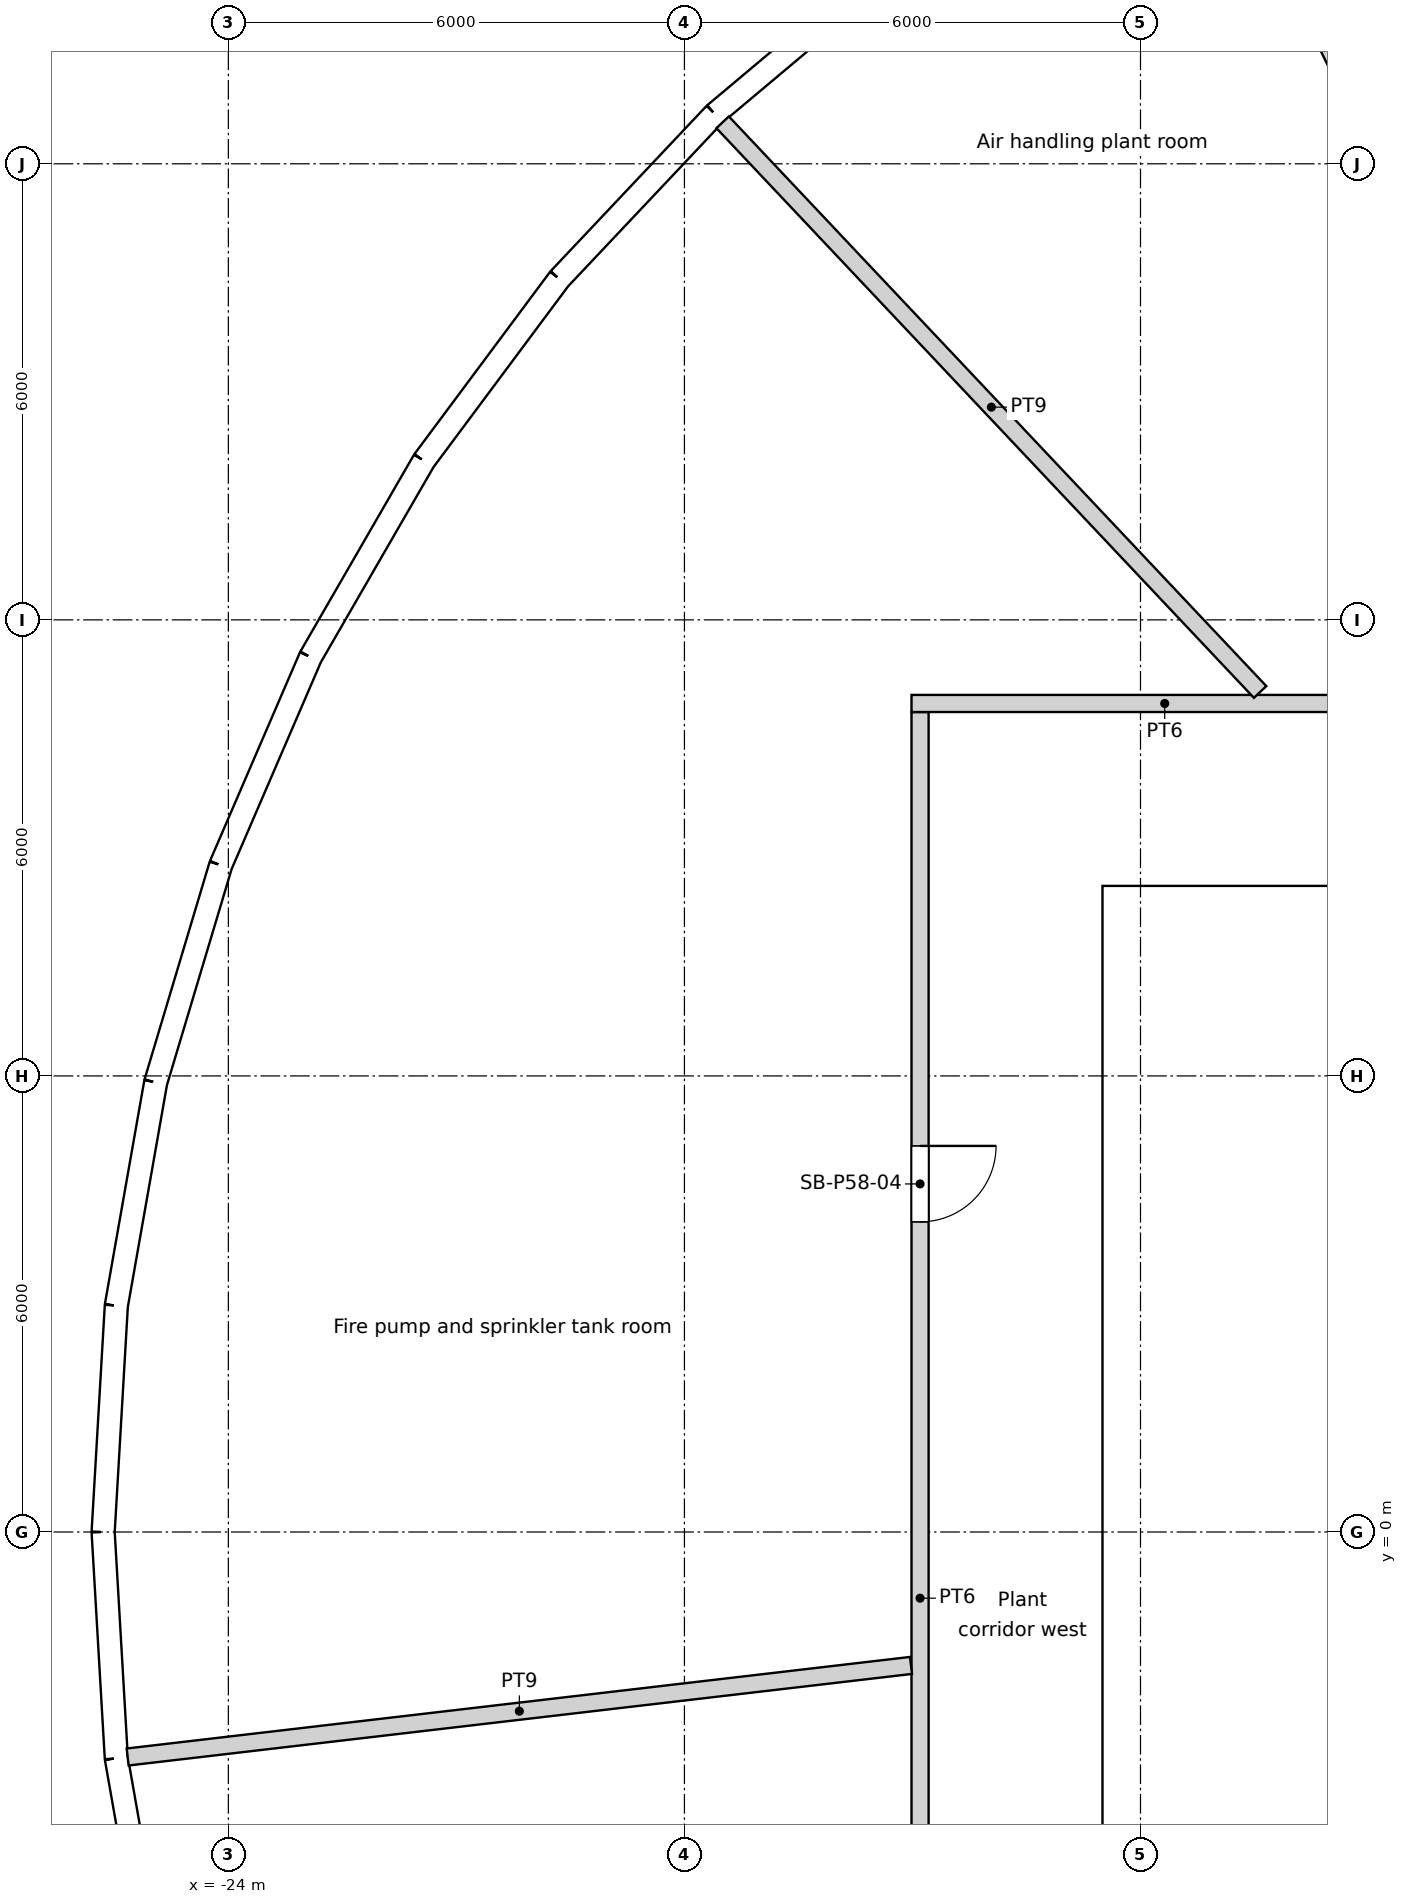
"""IFC4 building model, lengths in metres.
Left out: names, types, materials, properties, quantities, classifications, styles, units other than length and angle.
Written with IfcOpenShell. Run it as: python <this file> out.ifc"""

import sys

from ifc_helpers import new_model, si_unit, direction, frame, frame_2d, origin, origin_2d, place, context, subcontext, project, spatial, rectangle, circle, extrude, element, fill, save


model = new_model("IFC4")
c1 = context("Model", 3, precision=1e-05, world=origin(), true_north=direction((0.0, 1.0)))
c2 = subcontext(c1, "Body", "Model", "MODEL_VIEW")
j1 = project(units=[si_unit("LENGTHUNIT", "METRE"), si_unit("PLANEANGLEUNIT", "RADIAN")], contexts=[c1])
p1 = place(None, origin())
s1 = spatial("IfcSite", under=j1, at=p1, CompositionType="ELEMENT")
p2 = place(p1, origin())
s2 = spatial("IfcBuilding", under=s1, at=p2, CompositionType="ELEMENT")
p3 = place(p2, frame((0.0, 0.0, 225.0)))
s3 = spatial("IfcBuildingStorey", under=s2, at=p3, CompositionType="ELEMENT", Elevation=225.0)
for number, where, z_axis, x_axis in (
    (1, (-16.846, 17.855, 0.0), (0.0, 0.0, 1.0), (1.0, 0.0, 0.0)),
    (2, (-20.509, 13.489, 0.0), (0.0, 0.0, 1.0), (1.0, 0.0, 0.0)),
    (3, (-23.067, 8.396, 0.0), (0.0, 0.0, 1.0), (1.0, 0.0, 0.0)),
    (4, (-24.382, 2.85, 0.0), (0.0, 0.0, 1.0), (1.0, 0.0, 0.0)),
    (5, (-24.382, -2.85, 0.0), (0.0, 0.0, 1.0), (1.0, 0.0, 0.0)),
):
    element("IfcColumn", number, at=place(p3, frame(where, z_axis=z_axis, x_axis=x_axis)), inside=s3, PredefinedType="COLUMN", context=c2, shape_type="SweptSolid", body=[
        extrude(circle(Radius=0.6, at=origin_2d()), origin(), (0.0, 0.0, 1.0), 6.0),
    ])
for number, where, z_axis, x_axis in (
    (6, (-9.411, 16.301, 0.0), (0.0, 0.0, 1.0), (1.0, 0.0, 0.0)),
    (7, (-13.798, 12.802, 0.0), (0.0, 0.0, 1.0), (1.0, 0.0, 0.0)),
    (8, (-16.958, 8.167, 0.0), (0.0, 0.0, 1.0), (1.0, 0.0, 0.0)),
    (9, (-18.612, 2.805, 0.0), (0.0, 0.0, 1.0), (1.0, 0.0, 0.0)),
    (10, (-18.612, -2.805, 0.0), (0.0, 0.0, 1.0), (1.0, 0.0, 0.0)),
):
    element("IfcColumn", number, at=place(p3, frame(where, z_axis=z_axis, x_axis=x_axis)), inside=s3, PredefinedType="COLUMN", context=c2, shape_type="SweptSolid", body=[
        extrude(circle(Radius=0.65, at=origin_2d()), origin(), (0.0, 0.0, 1.0), 6.0),
    ])
p4 = place(p3, frame((-15.316, 20.573, 0.0), z_axis=(0.0, 0.0, 1.0), x_axis=(-0.766015999952, -0.64282150541, 0.0)))
e11 = element("IfcWall", 11, at=p4, inside=s3, PredefinedType="SOLIDWALL", context=c2, shape_type="SweptSolid", body=[
    extrude(rectangle(XDim=2.982, YDim=0.3, at=frame_2d((1.491, 0.0))), origin(), (0.0, 0.0, 1.0), 5.65),
])
p5 = place(p4, frame((1.491, 0.0, 1.825)))
e12 = element("IfcOpeningElement", 12, at=p5, cuts=e11, PredefinedType="OPENING", context=c2, shape_type="SweptSolid", body=[
    extrude(circle(Radius=1.2, at=origin_2d()), frame((0.0, 0.16, 0.0), z_axis=(0.0, -1.0, 0.0), x_axis=(1.0, 0.0, 0.0)), (0.0, 0.0, 1.0), 0.32),
])
p6 = place(p3, frame((-17.6, 18.655, 0.0), z_axis=(0.0, 0.0, 1.0), x_axis=(-0.686219609698, -0.72739442345, 0.0)))
e13 = element("IfcWall", 13, at=p6, inside=s3, PredefinedType="SOLIDWALL", context=c2, shape_type="SweptSolid", body=[
    extrude(rectangle(XDim=2.982, YDim=0.3, at=frame_2d((1.491, 0.0))), origin(), (0.0, 0.0, 1.0), 5.65),
])
p7 = place(p6, frame((1.491, 0.0, 1.825)))
e14 = element("IfcOpeningElement", 14, at=p7, cuts=e13, PredefinedType="OPENING", context=c2, shape_type="SweptSolid", body=[
    extrude(circle(Radius=1.2, at=origin_2d()), frame((0.0, 0.16, 0.0), z_axis=(0.0, -1.0, 0.0), x_axis=(1.0, 0.0, 0.0)), (0.0, 0.0, 1.0), 0.32),
])
p8 = place(p3, frame((-19.647, 16.486, 0.0), z_axis=(0.0, 0.0, 1.0), x_axis=(-0.597206768034, -0.802087324557, 0.0)))
e15 = element("IfcWall", 15, at=p8, inside=s3, PredefinedType="SOLIDWALL", context=c2, shape_type="SweptSolid", body=[
    extrude(rectangle(XDim=2.983, YDim=0.3, at=frame_2d((1.491, 0.0))), origin(), (0.0, 0.0, 1.0), 5.65),
])
p9 = place(p8, frame((1.491, 0.0, 1.825)))
e16 = element("IfcOpeningElement", 16, at=p9, cuts=e15, PredefinedType="OPENING", context=c2, shape_type="SweptSolid", body=[
    extrude(circle(Radius=1.2, at=origin_2d()), frame((0.0, 0.16, 0.0), z_axis=(0.0, -1.0, 0.0), x_axis=(1.0, 0.0, 0.0)), (0.0, 0.0, 1.0), 0.32),
])
p10 = place(p3, frame((-21.428, 14.094, 0.0), z_axis=(0.0, 0.0, 1.0), x_axis=(-0.499977539641, -0.866038370891, 0.0)))
e17 = element("IfcWall", 17, at=p10, inside=s3, PredefinedType="SOLIDWALL", context=c2, shape_type="SweptSolid", body=[
    extrude(rectangle(XDim=2.983, YDim=0.3, at=frame_2d((1.491, 0.0))), origin(), (0.0, 0.0, 1.0), 5.65),
])
p11 = place(p10, frame((1.491, 0.0, 1.825)))
e18 = element("IfcOpeningElement", 18, at=p11, cuts=e17, PredefinedType="OPENING", context=c2, shape_type="SweptSolid", body=[
    extrude(circle(Radius=1.2, at=origin_2d()), frame((0.0, 0.16, 0.0), z_axis=(0.0, -1.0, 0.0), x_axis=(1.0, 0.0, 0.0)), (0.0, 0.0, 1.0), 0.32),
])
p12 = place(p3, frame((-22.919, 11.51, 0.0), z_axis=(0.0, 0.0, 1.0), x_axis=(-0.396111410027, -0.918202456349, 0.0)))
e19 = element("IfcWall", 19, at=p12, inside=s3, PredefinedType="SOLIDWALL", context=c2, shape_type="SweptSolid", body=[
    extrude(rectangle(XDim=2.982, YDim=0.3, at=frame_2d((1.491, 0.0))), origin(), (0.0, 0.0, 1.0), 5.65),
])
p13 = place(p12, frame((1.491, 0.0, 1.825)))
e20 = element("IfcOpeningElement", 20, at=p13, cuts=e19, PredefinedType="OPENING", context=c2, shape_type="SweptSolid", body=[
    extrude(circle(Radius=1.2, at=origin_2d()), frame((0.0, 0.16, 0.0), z_axis=(0.0, -1.0, 0.0), x_axis=(1.0, 0.0, 0.0)), (0.0, 0.0, 1.0), 0.32),
])
p14 = place(p3, frame((-24.101, 8.772, 0.0), z_axis=(0.0, 0.0, 1.0), x_axis=(-0.286754535355, -0.958004089998, 0.0)))
e21 = element("IfcWall", 21, at=p14, inside=s3, PredefinedType="SOLIDWALL", context=c2, shape_type="SweptSolid", body=[
    extrude(rectangle(XDim=2.982, YDim=0.3, at=frame_2d((1.491, 0.0))), origin(), (0.0, 0.0, 1.0), 5.65),
])
p15 = place(p14, frame((1.491, 0.0, 1.825)))
e22 = element("IfcOpeningElement", 22, at=p15, cuts=e21, PredefinedType="OPENING", context=c2, shape_type="SweptSolid", body=[
    extrude(circle(Radius=1.2, at=origin_2d()), frame((0.0, 0.16, 0.0), z_axis=(0.0, -1.0, 0.0), x_axis=(1.0, 0.0, 0.0)), (0.0, 0.0, 1.0), 0.32),
])
p16 = place(p3, frame((-24.956, 5.915, 0.0), z_axis=(0.0, 0.0, 1.0), x_axis=(-0.17369661102, -0.984799211677, 0.0)))
e23 = element("IfcWall", 23, at=p16, inside=s3, PredefinedType="SOLIDWALL", context=c2, shape_type="SweptSolid", body=[
    extrude(rectangle(XDim=2.983, YDim=0.3, at=frame_2d((1.491, 0.0))), origin(), (0.0, 0.0, 1.0), 5.65),
])
p17 = place(p16, frame((1.491, 0.0, 1.825)))
e24 = element("IfcOpeningElement", 24, at=p17, cuts=e23, PredefinedType="OPENING", context=c2, shape_type="SweptSolid", body=[
    extrude(circle(Radius=1.2, at=origin_2d()), frame((0.0, 0.16, 0.0), z_axis=(0.0, -1.0, 0.0), x_axis=(1.0, 0.0, 0.0)), (0.0, 0.0, 1.0), 0.32),
])
p18 = place(p3, frame((-25.474, 2.978, 0.0), z_axis=(0.0, 0.0, 1.0), x_axis=(-0.058117409476, -0.998309754894, 0.0)))
e25 = element("IfcWall", 25, at=p18, inside=s3, PredefinedType="SOLIDWALL", context=c2, shape_type="SweptSolid", body=[
    extrude(rectangle(XDim=2.983, YDim=0.3, at=frame_2d((1.491, 0.0))), origin(), (0.0, 0.0, 1.0), 5.65),
])
p19 = place(p18, frame((1.491, 0.0, 1.825)))
e26 = element("IfcOpeningElement", 26, at=p19, cuts=e25, PredefinedType="OPENING", context=c2, shape_type="SweptSolid", body=[
    extrude(circle(Radius=1.2, at=origin_2d()), frame((0.0, 0.16, 0.0), z_axis=(0.0, -1.0, 0.0), x_axis=(1.0, 0.0, 0.0)), (0.0, 0.0, 1.0), 0.32),
])
p20 = place(p3, frame((-25.647, 0.0, 0.0), z_axis=(0.0, 0.0, 1.0), x_axis=(0.058117409476, -0.998309754894, 0.0)))
e27 = element("IfcWall", 27, at=p20, inside=s3, PredefinedType="SOLIDWALL", context=c2, shape_type="SweptSolid", body=[
    extrude(rectangle(XDim=2.983, YDim=0.3, at=frame_2d((1.491, 0.0))), origin(), (0.0, 0.0, 1.0), 5.65),
])
p21 = place(p20, frame((1.491, 0.0, 1.825)))
e28 = element("IfcOpeningElement", 28, at=p21, cuts=e27, PredefinedType="OPENING", context=c2, shape_type="SweptSolid", body=[
    extrude(circle(Radius=1.2, at=origin_2d()), frame((0.0, 0.16, 0.0), z_axis=(0.0, -1.0, 0.0), x_axis=(1.0, 0.0, 0.0)), (0.0, 0.0, 1.0), 0.32),
])
p22 = place(p3, frame((-25.474, -2.978, 0.0), z_axis=(0.0, 0.0, 1.0), x_axis=(0.17369661102, -0.984799211677, 0.0)))
e29 = element("IfcWall", 29, at=p22, inside=s3, PredefinedType="SOLIDWALL", context=c2, shape_type="SweptSolid", body=[
    extrude(rectangle(XDim=2.983, YDim=0.3, at=frame_2d((1.491, 0.0))), origin(), (0.0, 0.0, 1.0), 5.65),
])
p23 = place(p22, frame((1.491, 0.0, 1.825)))
e30 = element("IfcOpeningElement", 30, at=p23, cuts=e29, PredefinedType="OPENING", context=c2, shape_type="SweptSolid", body=[
    extrude(circle(Radius=1.2, at=origin_2d()), frame((0.0, 0.16, 0.0), z_axis=(0.0, -1.0, 0.0), x_axis=(1.0, 0.0, 0.0)), (0.0, 0.0, 1.0), 0.32),
])
p24 = place(p3, frame((-12.5, 8.05, 0.0), z_axis=(0.0, 0.0, 1.0), x_axis=(1.0, 0.0, 0.0)))
e31 = element("IfcWall", 31, at=p24, inside=s3, PredefinedType="SOLIDWALL", context=c2, shape_type="SweptSolid", body=[
    extrude(rectangle(XDim=25.0, YDim=0.9, at=frame_2d((12.5, 0.0))), origin(), (0.0, 0.0, 1.0), 5.65),
])
p25 = place(p24, frame((8.3, 0.0, 0.0)))
e32 = element("IfcOpeningElement", 32, at=p25, cuts=e31, PredefinedType="OPENING", context=c2, shape_type="SweptSolid", body=[
    extrude(rectangle(XDim=1.8, YDim=2.1, at=frame_2d((0.9, 1.05))), frame((0.0, 0.45, 0.0), z_axis=(0.0, -1.0, 0.0), x_axis=(1.0, 0.0, 0.0)), (0.0, 0.0, 1.0), 0.9),
])
p26 = place(p3, frame((-12.05, -7.6, 0.0), z_axis=(0.0, 0.0, 1.0), x_axis=(0.0, 1.0, 0.0)))
e33 = element("IfcWall", 33, at=p26, inside=s3, PredefinedType="SOLIDWALL", context=c2, shape_type="SweptSolid", body=[
    extrude(rectangle(XDim=15.2, YDim=0.9, at=frame_2d((7.6, 0.0))), origin(), (0.0, 0.0, 1.0), 5.65),
])
p27 = place(p26, frame((7.1, 0.0, 0.0)))
e34 = element("IfcOpeningElement", 34, at=p27, cuts=e33, PredefinedType="OPENING", context=c2, shape_type="SweptSolid", body=[
    extrude(rectangle(XDim=1.0, YDim=2.1, at=frame_2d((0.5, 1.05))), frame((0.0, 0.45, 0.0), z_axis=(0.0, -1.0, 0.0), x_axis=(1.0, 0.0, 0.0)), (0.0, 0.0, 1.0), 0.9),
])
p28 = place(p3, frame((-11.6, 4.55, 0.0), z_axis=(0.0, 0.0, 1.0), x_axis=(1.0, 0.0, 0.0)))
e35 = element("IfcWall", 35, at=p28, inside=s3, PredefinedType="SOLIDWALL", context=c2, shape_type="SweptSolid", body=[
    extrude(rectangle(XDim=2.4, YDim=0.3, at=frame_2d((1.2, 0.0))), origin(), (0.0, 0.0, 1.0), 5.65),
])
p29 = place(p28, frame((0.6, 0.0, 0.0)))
e36 = element("IfcOpeningElement", 36, at=p29, cuts=e35, PredefinedType="OPENING", context=c2, shape_type="SweptSolid", body=[
    extrude(rectangle(XDim=1.2, YDim=2.1, at=frame_2d((0.6, 1.05))), frame((0.0, 0.15, 0.0), z_axis=(0.0, -1.0, 0.0), x_axis=(1.0, 0.0, 0.0)), (0.0, 0.0, 1.0), 0.3),
])
p30 = place(p3, frame((-25.325, -2.96, 0.0), z_axis=(0.0, 0.0, 1.0), x_axis=(0.993240732078, 0.116072598582, 0.0)))
e37 = element("IfcWall", 37, at=p30, inside=s3, PredefinedType="PARTITIONING", context=c2, shape_type="SweptSolid", body=[
    extrude(rectangle(XDim=10.376, YDim=0.225, at=frame_2d((5.188, 0.0))), origin(), (0.0, 0.0, 1.0), 2.7),
])
p31 = place(p3, frame((-17.497, 18.546, 0.0), z_axis=(0.0, 0.0, 1.0), x_axis=(0.686241478279, -0.727373792138, 0.0)))
e38 = element("IfcWall", 38, at=p31, inside=s3, PredefinedType="PARTITIONING", context=c2, shape_type="SweptSolid", body=[
    extrude(rectangle(XDim=10.304, YDim=0.225, at=frame_2d((5.152, 0.0))), origin(), (0.0, 0.0, 1.0), 2.7),
])
p32 = place(p3, frame((-14.9, 10.788, 0.0), z_axis=(0.0, 0.0, 1.0), x_axis=(0.0, -1.0, 0.0)))
e39 = element("IfcWall", 39, at=p32, inside=s3, PredefinedType="PARTITIONING", context=c2, shape_type="SweptSolid", body=[
    extrude(rectangle(XDim=21.8, YDim=0.225, at=frame_2d((10.9, 0.0))), origin(), (0.0, 0.0, 1.0), 5.2),
])
p33 = place(p32, frame((5.708, 0.0, 0.0)))
e40 = element("IfcOpeningElement", 40, at=p33, cuts=e39, PredefinedType="OPENING", context=c2, shape_type="SweptSolid", body=[
    extrude(rectangle(XDim=1.0, YDim=2.1, at=frame_2d((0.5, 1.05))), frame((0.0, 0.113, 0.0), z_axis=(0.0, -1.0, 0.0), x_axis=(1.0, 0.0, 0.0)), (0.0, 0.0, 1.0), 0.225),
])
p34 = place(p32, frame((16.608, 0.0, 0.0)))
e41 = element("IfcOpeningElement", 41, at=p34, cuts=e39, PredefinedType="OPENING", context=c2, shape_type="SweptSolid", body=[
    extrude(rectangle(XDim=1.0, YDim=2.1, at=frame_2d((0.5, 1.05))), frame((0.0, 0.113, 0.0), z_axis=(0.0, -1.0, 0.0), x_axis=(1.0, 0.0, 0.0)), (0.0, 0.0, 1.0), 0.225),
])
p35 = place(p3, frame((-9.575, 19.633, 0.0), z_axis=(0.0, 0.0, 1.0), x_axis=(0.438353415496, -0.898802694212, 0.0)))
e42 = element("IfcWall", 42, at=p35, inside=s3, PredefinedType="PARTITIONING", context=c2, shape_type="SweptSolid", body=[
    extrude(rectangle(XDim=9.591, YDim=0.225, at=frame_2d((4.795, 0.0))), origin(), (0.0, 0.0, 1.0), 5.2),
])
p36 = place(p3, frame((-5.316, 10.9, 0.0), z_axis=(0.0, 0.0, 1.0), x_axis=(-1.0, 0.0, 0.0)))
e43 = element("IfcWall", 43, at=p36, inside=s3, PredefinedType="PARTITIONING", context=c2, shape_type="SweptSolid", body=[
    extrude(rectangle(XDim=9.696, YDim=0.225, at=frame_2d((4.848, 0.0))), origin(), (0.0, 0.0, 1.0), 5.2),
])
p37 = place(p36, frame((1.984, 0.0, 0.0)))
e44 = element("IfcOpeningElement", 44, at=p37, cuts=e43, PredefinedType="OPENING", context=c2, shape_type="SweptSolid", body=[
    extrude(rectangle(XDim=1.0, YDim=2.1, at=frame_2d((0.5, 1.05))), frame((0.0, 0.113, 0.0), z_axis=(0.0, -1.0, 0.0), x_axis=(1.0, 0.0, 0.0)), (0.0, 0.0, 1.0), 0.225),
])
p38 = place(p5, origin())
e45 = element("IfcWindow", 45, at=p38, inside=s3, PartitioningType="SINGLE_PANEL", PredefinedType="WINDOW", context=c2, shape_type="SweptSolid", body=[
    extrude(circle(Radius=1.2, at=origin_2d()), frame((0.0, 0.12, 0.0), z_axis=(0.0, -1.0, 0.0), x_axis=(1.0, 0.0, 0.0)), (0.0, 0.0, 1.0), 0.1),
])
fill(e12, e45)
p39 = place(p7, origin())
e46 = element("IfcWindow", 46, at=p39, inside=s3, PartitioningType="SINGLE_PANEL", PredefinedType="WINDOW", context=c2, shape_type="SweptSolid", body=[
    extrude(circle(Radius=1.2, at=origin_2d()), frame((0.0, 0.12, 0.0), z_axis=(0.0, -1.0, 0.0), x_axis=(1.0, 0.0, 0.0)), (0.0, 0.0, 1.0), 0.1),
])
fill(e14, e46)
p40 = place(p9, origin())
e47 = element("IfcWindow", 47, at=p40, inside=s3, PartitioningType="SINGLE_PANEL", PredefinedType="WINDOW", context=c2, shape_type="SweptSolid", body=[
    extrude(circle(Radius=1.2, at=origin_2d()), frame((0.0, 0.12, 0.0), z_axis=(0.0, -1.0, 0.0), x_axis=(1.0, 0.0, 0.0)), (0.0, 0.0, 1.0), 0.1),
])
fill(e16, e47)
p41 = place(p11, origin())
e48 = element("IfcWindow", 48, at=p41, inside=s3, PartitioningType="SINGLE_PANEL", PredefinedType="WINDOW", context=c2, shape_type="SweptSolid", body=[
    extrude(circle(Radius=1.2, at=origin_2d()), frame((0.0, 0.12, 0.0), z_axis=(0.0, -1.0, 0.0), x_axis=(1.0, 0.0, 0.0)), (0.0, 0.0, 1.0), 0.1),
])
fill(e18, e48)
p42 = place(p13, origin())
e49 = element("IfcWindow", 49, at=p42, inside=s3, PartitioningType="SINGLE_PANEL", PredefinedType="WINDOW", context=c2, shape_type="SweptSolid", body=[
    extrude(circle(Radius=1.2, at=origin_2d()), frame((0.0, 0.12, 0.0), z_axis=(0.0, -1.0, 0.0), x_axis=(1.0, 0.0, 0.0)), (0.0, 0.0, 1.0), 0.1),
])
fill(e20, e49)
p43 = place(p15, origin())
e50 = element("IfcWindow", 50, at=p43, inside=s3, PartitioningType="SINGLE_PANEL", PredefinedType="WINDOW", context=c2, shape_type="SweptSolid", body=[
    extrude(circle(Radius=1.2, at=origin_2d()), frame((0.0, 0.12, 0.0), z_axis=(0.0, -1.0, 0.0), x_axis=(1.0, 0.0, 0.0)), (0.0, 0.0, 1.0), 0.1),
])
fill(e22, e50)
p44 = place(p17, origin())
e51 = element("IfcWindow", 51, at=p44, inside=s3, PartitioningType="SINGLE_PANEL", PredefinedType="WINDOW", context=c2, shape_type="SweptSolid", body=[
    extrude(circle(Radius=1.2, at=origin_2d()), frame((0.0, 0.12, 0.0), z_axis=(0.0, -1.0, 0.0), x_axis=(1.0, 0.0, 0.0)), (0.0, 0.0, 1.0), 0.1),
])
fill(e24, e51)
p45 = place(p19, origin())
e52 = element("IfcWindow", 52, at=p45, inside=s3, PartitioningType="SINGLE_PANEL", PredefinedType="WINDOW", context=c2, shape_type="SweptSolid", body=[
    extrude(circle(Radius=1.2, at=origin_2d()), frame((0.0, 0.12, 0.0), z_axis=(0.0, -1.0, 0.0), x_axis=(1.0, 0.0, 0.0)), (0.0, 0.0, 1.0), 0.1),
])
fill(e26, e52)
p46 = place(p21, origin())
e53 = element("IfcWindow", 53, at=p46, inside=s3, PartitioningType="SINGLE_PANEL", PredefinedType="WINDOW", context=c2, shape_type="SweptSolid", body=[
    extrude(circle(Radius=1.2, at=origin_2d()), frame((0.0, 0.12, 0.0), z_axis=(0.0, -1.0, 0.0), x_axis=(1.0, 0.0, 0.0)), (0.0, 0.0, 1.0), 0.1),
])
fill(e28, e53)
p47 = place(p23, origin())
e54 = element("IfcWindow", 54, at=p47, inside=s3, PartitioningType="SINGLE_PANEL", PredefinedType="WINDOW", context=c2, shape_type="SweptSolid", body=[
    extrude(circle(Radius=1.2, at=origin_2d()), frame((0.0, 0.12, 0.0), z_axis=(0.0, -1.0, 0.0), x_axis=(1.0, 0.0, 0.0)), (0.0, 0.0, 1.0), 0.1),
])
fill(e30, e54)
p48 = place(p27, origin())
e55 = element("IfcDoor", 55, at=p48, inside=s3, OperationType="DOUBLE_DOOR_SINGLE_SWING", PredefinedType="DOOR", context=c2, shape_type="SweptSolid", body=[
    extrude(rectangle(XDim=1.0, YDim=2.1, at=frame_2d((0.5, 1.05))), frame((0.0, 0.025, 0.0), z_axis=(0.0, -1.0, 0.0), x_axis=(1.0, 0.0, 0.0)), (0.0, 0.0, 1.0), 0.05),
])
fill(e34, e55)
p49 = place(p29, origin())
e56 = element("IfcDoor", 56, at=p49, inside=s3, OperationType="SINGLE_SWING_LEFT", PredefinedType="DOOR", context=c2, shape_type="SweptSolid", body=[
    extrude(rectangle(XDim=1.2, YDim=2.1, at=frame_2d((0.6, 1.05))), frame((0.0, 0.025, 0.0), z_axis=(0.0, -1.0, 0.0), x_axis=(1.0, 0.0, 0.0)), (0.0, 0.0, 1.0), 0.05),
])
fill(e36, e56)
p50 = place(p33, origin())
e57 = element("IfcDoor", 57, at=p50, inside=s3, OperationType="SINGLE_SWING_LEFT", PredefinedType="DOOR", context=c2, shape_type="SweptSolid", body=[
    extrude(rectangle(XDim=1.0, YDim=2.1, at=frame_2d((0.5, 1.05))), frame((0.0, 0.025, 0.0), z_axis=(0.0, -1.0, 0.0), x_axis=(1.0, 0.0, 0.0)), (0.0, 0.0, 1.0), 0.05),
])
fill(e40, e57)
save(model, sys.argv[1])
